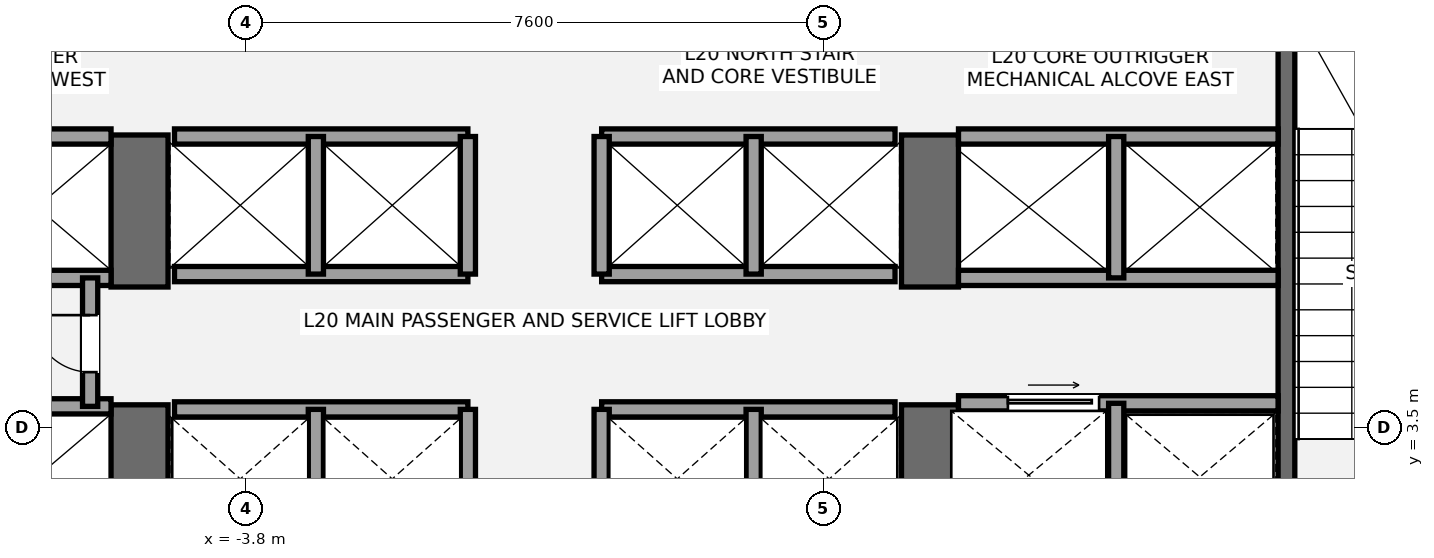
"""IFC4 building model, lengths in metres.
Left out: names, types, materials, properties, quantities, classifications, styles, units other than length and angle.
Written with IfcOpenShell. Run it as: python <this file> out.ifc"""

import sys

from ifc_helpers import new_model, si_unit, direction, frame, frame_2d, origin, place, context, subcontext, project, spatial, rectangle, extrude, element, fill, save


model = new_model("IFC4")
c1 = context("Model", 3, precision=1e-05, world=origin(), true_north=direction((0.0, 1.0)))
c2 = subcontext(c1, "Body", "Model", "MODEL_VIEW")
j1 = project(units=[si_unit("LENGTHUNIT", "METRE"), si_unit("PLANEANGLEUNIT", "RADIAN")], contexts=[c1])
p1 = place(None, origin())
s1 = spatial("IfcSite", under=j1, at=p1, CompositionType="ELEMENT")
p2 = place(p1, origin())
s2 = spatial("IfcBuilding", under=s1, at=p2, CompositionType="ELEMENT")
p3 = place(p2, frame((0.0, 0.0, 77.4)))
s3 = spatial("IfcBuildingStorey", under=s2, at=p3, CompositionType="ELEMENT", Elevation=77.4)
p4 = place(p3, frame((-5.2, 1.1, 0.0), z_axis=(0.0, 0.0, 1.0), x_axis=(0.0, 1.0, 0.0)))
e1 = element("IfcWall", 1, at=p4, inside=s3, PredefinedType="SHEAR", context=c2, shape_type="SweptSolid", body=[
    extrude(rectangle(XDim=2.7, YDim=0.75, at=frame_2d((1.35, 0.0))), origin(), (0.0, 0.0, 1.0), 4.5),
])
p5 = place(p3, frame((-5.2, 5.35, 0.0), z_axis=(0.0, 0.0, 1.0), x_axis=(0.0, 1.0, 0.0)))
e2 = element("IfcWall", 2, at=p5, inside=s3, PredefinedType="SHEAR", context=c2, shape_type="SweptSolid", body=[
    extrude(rectangle(XDim=2.0, YDim=0.75, at=frame_2d((1.0, 0.0))), origin(), (0.0, 0.0, 1.0), 4.5),
])
p6 = place(p3, frame((5.2, 1.1, 0.0), z_axis=(0.0, 0.0, 1.0), x_axis=(0.0, 1.0, 0.0)))
e3 = element("IfcWall", 3, at=p6, inside=s3, PredefinedType="SHEAR", context=c2, shape_type="SweptSolid", body=[
    extrude(rectangle(XDim=2.7, YDim=0.75, at=frame_2d((1.35, 0.0))), origin(), (0.0, 0.0, 1.0), 4.5),
])
p7 = place(p3, frame((5.2, 5.35, 0.0), z_axis=(0.0, 0.0, 1.0), x_axis=(0.0, 1.0, 0.0)))
e4 = element("IfcWall", 4, at=p7, inside=s3, PredefinedType="SHEAR", context=c2, shape_type="SweptSolid", body=[
    extrude(rectangle(XDim=2.0, YDim=0.75, at=frame_2d((1.0, 0.0))), origin(), (0.0, 0.0, 1.0), 4.5),
])
p8 = place(p3, frame((9.89, 1.85, 0.0), z_axis=(0.0, 0.0, 1.0), x_axis=(0.0, 1.0, 0.0)))
e5 = element("IfcWall", 5, at=p8, inside=s3, PredefinedType="SHEAR", context=c2, shape_type="SweptSolid", body=[
    extrude(rectangle(XDim=7.15, YDim=0.22, at=frame_2d((3.575, 0.0))), origin(), (0.0, 0.0, 1.0), 4.5),
])
for number, where, z_axis, x_axis in (
    (6, (-9.78, 3.78, 0.0), (0.0, 0.0, 1.0), (1.0, 0.0, 0.0)),
    (7, (-9.78, 5.47, 0.0), (0.0, 0.0, 1.0), (1.0, 0.0, 0.0)),
    (8, (-9.78, 7.33, 0.0), (0.0, 0.0, 1.0), (1.0, 0.0, 0.0)),
):
    element("IfcWall", number, at=place(p3, frame(where, z_axis=z_axis, x_axis=x_axis)), inside=s3, PredefinedType="SOLIDWALL", context=c2, shape_type="SweptSolid", body=[
        extrude(rectangle(XDim=4.205, YDim=0.2, at=frame_2d((2.103, 0.0))), origin(), (0.0, 0.0, 1.0), 4.28),
    ])
p9 = place(p3, frame((-5.85, 3.78, 0.0), z_axis=(0.0, 0.0, 1.0), x_axis=(0.0, 1.0, 0.0)))
e9 = element("IfcWall", 9, at=p9, inside=s3, PredefinedType="SOLIDWALL", context=c2, shape_type="SweptSolid", body=[
    extrude(rectangle(XDim=1.69, YDim=0.2, at=frame_2d((0.845, 0.0))), origin(), (0.0, 0.0, 1.0), 4.28),
])
p10 = place(p9, frame((0.45, 0.0, 0.0)))
e10 = element("IfcOpeningElement", 10, at=p10, cuts=e9, PredefinedType="OPENING", context=c2, shape_type="SweptSolid", body=[
    extrude(rectangle(XDim=0.75, YDim=2.1, at=frame_2d((0.375, 1.05))), frame((0.0, 0.11, 0.0), z_axis=(0.0, -1.0, 0.0), x_axis=(1.0, 0.0, 0.0)), (0.0, 0.0, 1.0), 0.22),
])
p11 = place(p3, frame((5.575, 3.82, 0.0), z_axis=(0.0, 0.0, 1.0), x_axis=(1.0, 0.0, 0.0)))
e11 = element("IfcWall", 11, at=p11, inside=s3, PredefinedType="SOLIDWALL", context=c2, shape_type="SweptSolid", body=[
    extrude(rectangle(XDim=4.205, YDim=0.2, at=frame_2d((2.103, 0.0))), origin(), (0.0, 0.0, 1.0), 4.28),
])
p12 = place(p11, frame((0.65, 0.0, 0.0)))
e12 = element("IfcOpeningElement", 12, at=p12, cuts=e11, PredefinedType="OPENING", context=c2, shape_type="SweptSolid", body=[
    extrude(rectangle(XDim=1.2, YDim=2.2, at=frame_2d((0.6, 1.1))), frame((0.0, 0.11, 0.0), z_axis=(0.0, -1.0, 0.0), x_axis=(1.0, 0.0, 0.0)), (0.0, 0.0, 1.0), 0.22),
])
p13 = place(p3, frame((7.65, 1.85, 0.0), z_axis=(0.0, 0.0, 1.0), x_axis=(0.0, 1.0, 0.0)))
e13 = element("IfcWall", 13, at=p13, inside=s3, PredefinedType="SOLIDWALL", context=c2, shape_type="SweptSolid", body=[
    extrude(rectangle(XDim=1.97, YDim=0.2, at=frame_2d((0.985, 0.0))), origin(), (0.0, 0.0, 1.0), 4.28),
])
for number, where, z_axis, x_axis in (
    (14, (5.575, 5.47, 0.0), (0.0, 0.0, 1.0), (1.0, 0.0, 0.0)),
    (15, (5.575, 7.33, 0.0), (0.0, 0.0, 1.0), (1.0, 0.0, 0.0)),
):
    element("IfcWall", number, at=place(p3, frame(where, z_axis=z_axis, x_axis=x_axis)), inside=s3, PredefinedType="SOLIDWALL", context=c2, shape_type="SweptSolid", body=[
        extrude(rectangle(XDim=4.205, YDim=0.2, at=frame_2d((2.103, 0.0))), origin(), (0.0, 0.0, 1.0), 4.28),
    ])
p14 = place(p3, frame((7.65, 5.47, 0.0), z_axis=(0.0, 0.0, 1.0), x_axis=(0.0, 1.0, 0.0)))
e16 = element("IfcWall", 16, at=p14, inside=s3, PredefinedType="SOLIDWALL", context=c2, shape_type="SweptSolid", body=[
    extrude(rectangle(XDim=1.86, YDim=0.2, at=frame_2d((0.93, 0.0))), origin(), (0.0, 0.0, 1.0), 4.28),
])
for number, where, z_axis, x_axis in (
    (17, (-4.74, 3.74, 0.0), (0.0, 0.0, 1.0), (1.0, 0.0, 0.0)),
    (18, (0.88, 3.74, 0.0), (0.0, 0.0, 1.0), (1.0, 0.0, 0.0)),
):
    element("IfcWall", number, at=place(p3, frame(where, z_axis=z_axis, x_axis=x_axis)), inside=s3, PredefinedType="SOLIDWALL", context=c2, shape_type="SweptSolid", body=[
        extrude(rectangle(XDim=3.86, YDim=0.2, at=frame_2d((1.93, 0.0))), origin(), (0.0, 0.0, 1.0), 4.28),
    ])
for number, where, z_axis, x_axis in (
    (19, (-2.88, 1.92, 0.0), (0.0, 0.0, 1.0), (0.0, 1.0, 0.0)),
    (20, (2.88, 1.92, 0.0), (0.0, 0.0, 1.0), (0.0, 1.0, 0.0)),
    (21, (-0.88, 1.92, 0.0), (0.0, 0.0, 1.0), (0.0, 1.0, 0.0)),
    (22, (0.88, 1.92, 0.0), (0.0, 0.0, 1.0), (0.0, 1.0, 0.0)),
):
    element("IfcWall", number, at=place(p3, frame(where, z_axis=z_axis, x_axis=x_axis)), inside=s3, PredefinedType="SOLIDWALL", context=c2, shape_type="SweptSolid", body=[
        extrude(rectangle(XDim=1.82, YDim=0.2, at=frame_2d((0.91, 0.0))), origin(), (0.0, 0.0, 1.0), 4.28),
    ])
for number, where, z_axis, x_axis in (
    (23, (-4.74, 5.52, 0.0), (0.0, 0.0, 1.0), (1.0, 0.0, 0.0)),
    (24, (0.88, 5.52, 0.0), (0.0, 0.0, 1.0), (1.0, 0.0, 0.0)),
    (25, (-4.74, 7.33, 0.0), (0.0, 0.0, 1.0), (1.0, 0.0, 0.0)),
    (26, (0.88, 7.33, 0.0), (0.0, 0.0, 1.0), (1.0, 0.0, 0.0)),
):
    element("IfcWall", number, at=place(p3, frame(where, z_axis=z_axis, x_axis=x_axis)), inside=s3, PredefinedType="SOLIDWALL", context=c2, shape_type="SweptSolid", body=[
        extrude(rectangle(XDim=3.86, YDim=0.2, at=frame_2d((1.93, 0.0))), origin(), (0.0, 0.0, 1.0), 4.28),
    ])
for number, where, z_axis, x_axis in (
    (27, (-2.88, 5.52, 0.0), (0.0, 0.0, 1.0), (0.0, 1.0, 0.0)),
    (28, (2.88, 5.52, 0.0), (0.0, 0.0, 1.0), (0.0, 1.0, 0.0)),
    (29, (-0.88, 5.52, 0.0), (0.0, 0.0, 1.0), (0.0, 1.0, 0.0)),
    (30, (0.88, 5.52, 0.0), (0.0, 0.0, 1.0), (0.0, 1.0, 0.0)),
):
    element("IfcWall", number, at=place(p3, frame(where, z_axis=z_axis, x_axis=x_axis)), inside=s3, PredefinedType="SOLIDWALL", context=c2, shape_type="SweptSolid", body=[
        extrude(rectangle(XDim=1.81, YDim=0.2, at=frame_2d((0.905, 0.0))), origin(), (0.0, 0.0, 1.0), 4.28),
    ])
p15 = place(p10, origin())
e31 = element("IfcDoor", 31, at=p15, inside=s3, OperationType="SINGLE_SWING_RIGHT", PredefinedType="DOOR", context=c2, shape_type="SweptSolid", body=[
    extrude(rectangle(XDim=0.75, YDim=2.1, at=frame_2d((0.375, 1.05))), frame((0.0, 0.025, 0.0), z_axis=(0.0, -1.0, 0.0), x_axis=(1.0, 0.0, 0.0)), (0.0, 0.0, 1.0), 0.05),
])
fill(e10, e31)
p16 = place(p12, origin())
e32 = element("IfcDoor", 32, at=p16, inside=s3, OperationType="SLIDING_TO_RIGHT", PredefinedType="DOOR", context=c2, shape_type="SweptSolid", body=[
    extrude(rectangle(XDim=1.2, YDim=2.2, at=frame_2d((0.6, 1.1))), frame((0.0, 0.025, 0.0), z_axis=(0.0, -1.0, 0.0), x_axis=(1.0, 0.0, 0.0)), (0.0, 0.0, 1.0), 0.05),
])
fill(e12, e32)
save(model, sys.argv[1])
